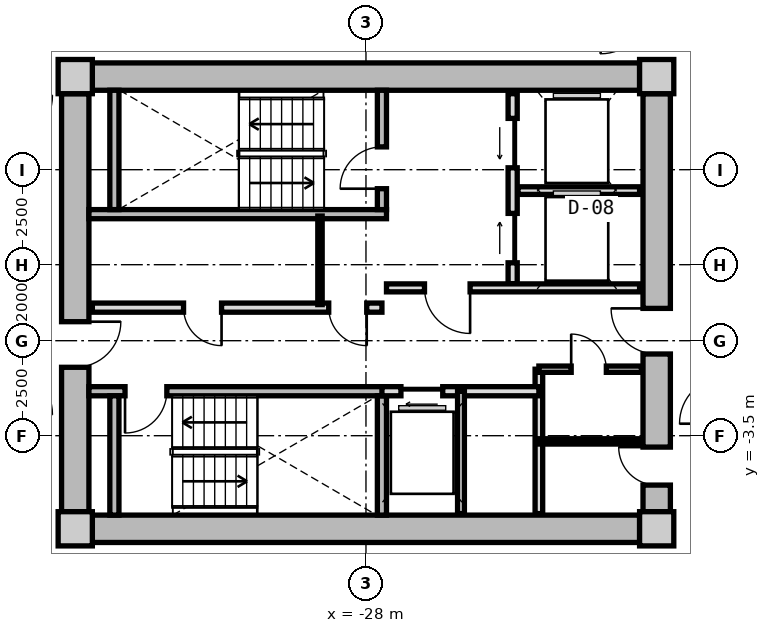
"""IFC4 building model, lengths in metres.
Left out: names, types, materials, properties, quantities, classifications, styles, units other than length and angle.
Written with IfcOpenShell. Run it as: python <this file> out.ifc"""

import sys

from ifc_helpers import new_model, si_unit, direction, frame, frame_2d, origin, origin_2d, place, context, subcontext, project, spatial, rectangle, extrude, source, transform, mapped, element, fill, save


model = new_model("IFC4")
c1 = context("Model", 3, precision=1e-05, world=origin(), true_north=direction((0.0, 1.0)))
c2 = subcontext(c1, "Body", "Model", "MODEL_VIEW")
j1 = project(units=[si_unit("LENGTHUNIT", "METRE"), si_unit("PLANEANGLEUNIT", "RADIAN")], contexts=[c1])
p1 = place(None, origin())
s1 = spatial("IfcSite", under=j1, at=p1, CompositionType="ELEMENT")
p2 = place(p1, origin())
s2 = spatial("IfcBuilding", under=s1, at=p2, CompositionType="ELEMENT")
p3 = place(p2, frame((0.0, 0.0, 93.2)))
s3 = spatial("IfcBuildingStorey", under=s2, at=p3, CompositionType="ELEMENT", Elevation=93.2)
m1 = source(origin(), c2, "Body", "SweptSolid", [
    extrude(rectangle(XDim=0.9, YDim=0.9, at=origin_2d()), origin(), (0.0, 0.0, 1.0), 3.05),
])
for number, where, z_axis, x_axis in (
    (1, (-35.65, -5.95, 0.0), (0.0, 0.0, 1.0), (1.0, 0.0, 0.0)),
    (2, (-20.35, -5.95, 0.0), (0.0, 0.0, 1.0), (1.0, 0.0, 0.0)),
    (3, (-20.35, 5.95, 0.0), (0.0, 0.0, 1.0), (1.0, 0.0, 0.0)),
    (4, (-35.65, 5.95, 0.0), (0.0, 0.0, 1.0), (1.0, 0.0, 0.0)),
):
    element("IfcColumn", number, at=place(p3, frame(where, z_axis=z_axis, x_axis=x_axis)), inside=s3, PredefinedType="COLUMN", context=c2, shape_type="MappedRepresentation", body=[
        mapped(m1, transform((0.0, 0.0, 0.0), x_axis=(1.0, 0.0, 0.0), y_axis=(0.0, 1.0, 0.0), z_axis=(0.0, 0.0, 1.0), scale=1.0)),
    ])
m2 = source(origin(), c2, "Body", "SweptSolid", [
    extrude(rectangle(XDim=14.4, YDim=0.72, at=frame_2d((7.2, 0.0))), origin(), (0.0, 0.0, 1.0), 2.79),
])
for number, where, z_axis, x_axis in (
    (5, (-35.2, 5.95, 0.0), (0.0, 0.0, 1.0), (1.0, 0.0, 0.0)),
    (6, (-20.8, -5.95, 0.0), (0.0, 0.0, 1.0), (-1.0, 0.0, 0.0)),
):
    element("IfcWall", number, at=place(p3, frame(where, z_axis=z_axis, x_axis=x_axis)), inside=s3, PredefinedType="SHEAR", context=c2, shape_type="MappedRepresentation", body=[
        mapped(m2, transform((0.0, 0.0, 0.0), x_axis=(1.0, 0.0, 0.0), y_axis=(0.0, 1.0, 0.0), z_axis=(0.0, 0.0, 1.0), scale=1.0)),
    ])
m3 = source(origin(), c2, "Body", "SweptSolid", [
    extrude(rectangle(XDim=11.0, YDim=0.72, at=frame_2d((5.5, 0.0))), origin(), (0.0, 0.0, 1.0), 2.79),
])
p4 = place(p3, frame((-35.65, -5.5, 0.0), z_axis=(0.0, 0.0, 1.0), x_axis=(0.0, 1.0, 0.0)))
e7 = element("IfcWall", 7, at=p4, inside=s3, PredefinedType="SHEAR", context=c2, shape_type="MappedRepresentation", body=[
    mapped(m3, transform((0.0, 0.0, 0.0), x_axis=(1.0, 0.0, 0.0), y_axis=(0.0, 1.0, 0.0), z_axis=(0.0, 0.0, 1.0), scale=1.0)),
])
p5 = place(p4, frame((3.8, 0.0, 0.0)))
e8 = element("IfcOpeningElement", 8, at=p5, cuts=e7, PredefinedType="OPENING", context=c2, shape_type="SweptSolid", body=[
    extrude(rectangle(XDim=1.2, YDim=2.15, at=frame_2d((0.6, 1.075))), frame((0.0, 0.37, 0.0), z_axis=(0.0, -1.0, 0.0), x_axis=(1.0, 0.0, 0.0)), (0.0, 0.0, 1.0), 0.74),
])
p6 = place(p3, frame((-20.35, 5.5, 0.0), z_axis=(0.0, 0.0, 1.0), x_axis=(0.0, -1.0, 0.0)))
e9 = element("IfcWall", 9, at=p6, inside=s3, PredefinedType="SHEAR", context=c2, shape_type="MappedRepresentation", body=[
    mapped(m3, transform((0.0, 0.0, 0.0), x_axis=(1.0, 0.0, 0.0), y_axis=(0.0, 1.0, 0.0), z_axis=(0.0, 0.0, 1.0), scale=1.0)),
])
p7 = place(p6, frame((5.65, 0.0, 0.0)))
e10 = element("IfcOpeningElement", 10, at=p7, cuts=e9, PredefinedType="OPENING", context=c2, shape_type="SweptSolid", body=[
    extrude(rectangle(XDim=1.2, YDim=2.15, at=frame_2d((0.6, 1.075))), frame((0.0, 0.37, 0.0), z_axis=(0.0, -1.0, 0.0), x_axis=(1.0, 0.0, 0.0)), (0.0, 0.0, 1.0), 0.74),
])
p8 = place(p6, frame((9.3, 0.0, 0.0)))
e11 = element("IfcOpeningElement", 11, at=p8, cuts=e9, PredefinedType="OPENING", context=c2, shape_type="SweptSolid", body=[
    extrude(rectangle(XDim=1.0, YDim=2.1, at=frame_2d((0.5, 1.05))), frame((0.0, 0.37, 0.0), z_axis=(0.0, -1.0, 0.0), x_axis=(1.0, 0.0, 0.0)), (0.0, 0.0, 1.0), 0.74),
])
m4 = source(origin(), c2, "Body", "SweptSolid", [
    extrude(rectangle(XDim=7.83, YDim=0.24, at=frame_2d((3.915, 0.0))), origin(), (0.0, 0.0, 1.0), 2.79),
])
p9 = place(p3, frame((-35.29, 2.33, 0.0), z_axis=(0.0, 0.0, 1.0), x_axis=(1.0, 0.0, 0.0)))
e12 = element("IfcWall", 12, at=p9, inside=s3, PredefinedType="PARTITIONING", context=c2, shape_type="MappedRepresentation", body=[
    mapped(m4, transform((0.0, 0.0, 0.0), x_axis=(1.0, 0.0, 0.0), y_axis=(0.0, 1.0, 0.0), z_axis=(0.0, 0.0, 1.0), scale=1.0)),
])
m5 = source(origin(), c2, "Body", "SweptSolid", [
    extrude(rectangle(XDim=3.14, YDim=0.24, at=frame_2d((1.57, 0.0))), origin(), (0.0, 0.0, 1.0), 2.79),
])
p10 = place(p3, frame((-34.62, 2.45, 0.0), z_axis=(0.0, 0.0, 1.0), x_axis=(0.0, 1.0, 0.0)))
e13 = element("IfcWall", 13, at=p10, inside=s3, PredefinedType="PARTITIONING", context=c2, shape_type="MappedRepresentation", body=[
    mapped(m5, transform((0.0, 0.0, 0.0), x_axis=(1.0, 0.0, 0.0), y_axis=(0.0, 1.0, 0.0), z_axis=(0.0, 0.0, 1.0), scale=1.0)),
])
p11 = place(p3, frame((-27.58, 2.45, 0.0), z_axis=(0.0, 0.0, 1.0), x_axis=(0.0, 1.0, 0.0)))
e14 = element("IfcWall", 14, at=p11, inside=s3, PredefinedType="PARTITIONING", context=c2, shape_type="MappedRepresentation", body=[
    mapped(m5, transform((0.0, 0.0, 0.0), x_axis=(1.0, 0.0, 0.0), y_axis=(0.0, 1.0, 0.0), z_axis=(0.0, 0.0, 1.0), scale=1.0)),
])
p12 = place(p11, frame((0.55, 0.0, 0.0)))
e15 = element("IfcOpeningElement", 15, at=p12, cuts=e14, PredefinedType="OPENING", context=c2, shape_type="SweptSolid", body=[
    extrude(rectangle(XDim=1.1, YDim=2.15, at=frame_2d((0.55, 1.075))), frame((0.0, 0.13, 0.0), z_axis=(0.0, -1.0, 0.0), x_axis=(1.0, 0.0, 0.0)), (0.0, 0.0, 1.0), 0.26),
])
p13 = place(p3, frame((-35.29, -2.33, 0.0), z_axis=(0.0, 0.0, 1.0), x_axis=(1.0, 0.0, 0.0)))
e16 = element("IfcWall", 16, at=p13, inside=s3, PredefinedType="PARTITIONING", context=c2, shape_type="MappedRepresentation", body=[
    mapped(m4, transform((0.0, 0.0, 0.0), x_axis=(1.0, 0.0, 0.0), y_axis=(0.0, 1.0, 0.0), z_axis=(0.0, 0.0, 1.0), scale=1.0)),
])
p14 = place(p13, frame((0.95, 0.0, 0.0)))
e17 = element("IfcOpeningElement", 17, at=p14, cuts=e16, PredefinedType="OPENING", context=c2, shape_type="SweptSolid", body=[
    extrude(rectangle(XDim=1.1, YDim=2.15, at=frame_2d((0.55, 1.075))), frame((0.0, 0.13, 0.0), z_axis=(0.0, -1.0, 0.0), x_axis=(1.0, 0.0, 0.0)), (0.0, 0.0, 1.0), 0.26),
])
for number, where, z_axis, x_axis in (
    (18, (-34.62, -5.59, 0.0), (0.0, 0.0, 1.0), (0.0, 1.0, 0.0)),
    (19, (-27.58, -5.59, 0.0), (0.0, 0.0, 1.0), (0.0, 1.0, 0.0)),
):
    element("IfcWall", number, at=place(p3, frame(where, z_axis=z_axis, x_axis=x_axis)), inside=s3, PredefinedType="PARTITIONING", context=c2, shape_type="MappedRepresentation", body=[
        mapped(m5, transform((0.0, 0.0, 0.0), x_axis=(1.0, 0.0, 0.0), y_axis=(0.0, 1.0, 0.0), z_axis=(0.0, 0.0, 1.0), scale=1.0)),
    ])
m6 = source(origin(), c2, "Body", "SweptSolid", [
    extrude(rectangle(XDim=5.0, YDim=0.24, at=frame_2d((2.5, 0.0))), origin(), (0.0, 0.0, 1.0), 2.775),
])
p15 = place(p3, frame((-24.14, 0.5, 0.0), z_axis=(0.0, 0.0, 1.0), x_axis=(0.0, 1.0, 0.0)))
e20 = element("IfcWall", 20, at=p15, inside=s3, PredefinedType="PARTITIONING", context=c2, shape_type="MappedRepresentation", body=[
    mapped(m6, transform((0.0, 0.0, 0.0), x_axis=(1.0, 0.0, 0.0), y_axis=(0.0, 1.0, 0.0), z_axis=(0.0, 0.0, 1.0), scale=1.0)),
])
p16 = place(p15, frame((3.05, 0.0, 0.0)))
e21 = element("IfcOpeningElement", 21, at=p16, cuts=e20, PredefinedType="OPENING", context=c2, shape_type="SweptSolid", body=[
    extrude(rectangle(XDim=1.3, YDim=2.2, at=frame_2d((0.65, 1.1))), frame((0.0, 0.13, 0.0), z_axis=(0.0, -1.0, 0.0), x_axis=(1.0, 0.0, 0.0)), (0.0, 0.0, 1.0), 0.26),
])
p17 = place(p15, frame((0.55, 0.0, 0.0)))
e22 = element("IfcOpeningElement", 22, at=p17, cuts=e20, PredefinedType="OPENING", context=c2, shape_type="SweptSolid", body=[
    extrude(rectangle(XDim=1.3, YDim=2.2, at=frame_2d((0.65, 1.1))), frame((0.0, 0.13, 0.0), z_axis=(0.0, -1.0, 0.0), x_axis=(1.0, 0.0, 0.0)), (0.0, 0.0, 1.0), 0.26),
])
m7 = source(origin(), c2, "Body", "SweptSolid", [
    extrude(rectangle(XDim=3.2, YDim=0.2, at=frame_2d((1.6, 0.0))), origin(), (0.0, 0.0, 1.0), 2.775),
])
p18 = place(p3, frame((-24.0, 2.95, 0.0), z_axis=(0.0, 0.0, 1.0), x_axis=(1.0, 0.0, 0.0)))
e23 = element("IfcWall", 23, at=p18, inside=s3, PredefinedType="PARTITIONING", context=c2, shape_type="MappedRepresentation", body=[
    mapped(m7, transform((0.0, 0.0, 0.0), x_axis=(1.0, 0.0, 0.0), y_axis=(0.0, 1.0, 0.0), z_axis=(0.0, 0.0, 1.0), scale=1.0)),
])
m8 = source(origin(), c2, "Body", "SweptSolid", [
    extrude(rectangle(XDim=6.66, YDim=0.21, at=frame_2d((3.33, 0.0))), origin(), (0.0, 0.0, 1.0), 2.775),
])
p19 = place(p3, frame((-27.46, 0.39, 0.0), z_axis=(0.0, 0.0, 1.0), x_axis=(1.0, 0.0, 0.0)))
e24 = element("IfcWall", 24, at=p19, inside=s3, PredefinedType="PARTITIONING", context=c2, shape_type="MappedRepresentation", body=[
    mapped(m8, transform((0.0, 0.0, 0.0), x_axis=(1.0, 0.0, 0.0), y_axis=(0.0, 1.0, 0.0), z_axis=(0.0, 0.0, 1.0), scale=1.0)),
])
p20 = place(p19, frame((1.0, 0.0, 0.0)))
e25 = element("IfcOpeningElement", 25, at=p20, cuts=e24, PredefinedType="OPENING", context=c2, shape_type="SweptSolid", body=[
    extrude(rectangle(XDim=1.2, YDim=2.15, at=frame_2d((0.6, 1.075))), frame((0.0, 0.115, 0.0), z_axis=(0.0, -1.0, 0.0), x_axis=(1.0, 0.0, 0.0)), (0.0, 0.0, 1.0), 0.23),
])
m9 = source(origin(), c2, "Body", "SweptSolid", [
    extrude(rectangle(XDim=7.62, YDim=0.24, at=frame_2d((3.81, 0.0))), origin(), (0.0, 0.0, 1.0), 2.775),
])
p21 = place(p3, frame((-35.2, -0.13, 0.0), z_axis=(0.0, 0.0, 1.0), x_axis=(1.0, 0.0, 0.0)))
e26 = element("IfcWall", 26, at=p21, inside=s3, PredefinedType="PARTITIONING", context=c2, shape_type="MappedRepresentation", body=[
    mapped(m9, transform((0.0, 0.0, 0.0), x_axis=(1.0, 0.0, 0.0), y_axis=(0.0, 1.0, 0.0), z_axis=(0.0, 0.0, 1.0), scale=1.0)),
])
p22 = place(p21, frame((6.22, 0.0, 0.0)))
e27 = element("IfcOpeningElement", 27, at=p22, cuts=e26, PredefinedType="OPENING", context=c2, shape_type="SweptSolid", body=[
    extrude(rectangle(XDim=1.0, YDim=2.1, at=frame_2d((0.5, 1.05))), frame((0.0, 0.13, 0.0), z_axis=(0.0, -1.0, 0.0), x_axis=(1.0, 0.0, 0.0)), (0.0, 0.0, 1.0), 0.26),
])
p23 = place(p21, frame((2.4, 0.0, 0.0)))
e28 = element("IfcOpeningElement", 28, at=p23, cuts=e26, PredefinedType="OPENING", context=c2, shape_type="SweptSolid", body=[
    extrude(rectangle(XDim=1.0, YDim=2.1, at=frame_2d((0.5, 1.05))), frame((0.0, 0.13, 0.0), z_axis=(0.0, -1.0, 0.0), x_axis=(1.0, 0.0, 0.0)), (0.0, 0.0, 1.0), 0.26),
])
m10 = source(origin(), c2, "Body", "SweptSolid", [
    extrude(rectangle(XDim=2.33, YDim=0.115, at=frame_2d((1.165, 0.0))), origin(), (0.0, 0.0, 1.0), 2.775),
])
p24 = place(p3, frame((-29.21, -0.05, 0.0), z_axis=(0.0, 0.0, 1.0), x_axis=(0.0, 1.0, 0.0)))
e29 = element("IfcWall", 29, at=p24, inside=s3, PredefinedType="PARTITIONING", context=c2, shape_type="MappedRepresentation", body=[
    mapped(m10, transform((0.0, 0.0, 0.0), x_axis=(1.0, 0.0, 0.0), y_axis=(0.0, 1.0, 0.0), z_axis=(0.0, 0.0, 1.0), scale=1.0)),
])
m11 = source(origin(), c2, "Body", "SweptSolid", [
    extrude(rectangle(XDim=3.8, YDim=0.2, at=frame_2d((1.9, 0.0))), origin(), (0.0, 0.0, 1.0), 2.775),
])
p25 = place(p3, frame((-23.45, -5.55, 0.0), z_axis=(0.0, 0.0, 1.0), x_axis=(0.0, 1.0, 0.0)))
e30 = element("IfcWall", 30, at=p25, inside=s3, PredefinedType="PARTITIONING", context=c2, shape_type="MappedRepresentation", body=[
    mapped(m11, transform((0.0, 0.0, 0.0), x_axis=(1.0, 0.0, 0.0), y_axis=(0.0, 1.0, 0.0), z_axis=(0.0, 0.0, 1.0), scale=1.0)),
])
m12 = source(origin(), c2, "Body", "SweptSolid", [
    extrude(rectangle(XDim=4.13, YDim=0.24, at=frame_2d((2.065, 0.0))), origin(), (0.0, 0.0, 1.0), 2.775),
])
p26 = place(p3, frame((-27.58, -2.33, 0.0), z_axis=(0.0, 0.0, 1.0), x_axis=(1.0, 0.0, 0.0)))
e31 = element("IfcWall", 31, at=p26, inside=s3, PredefinedType="PARTITIONING", context=c2, shape_type="MappedRepresentation", body=[
    mapped(m12, transform((0.0, 0.0, 0.0), x_axis=(1.0, 0.0, 0.0), y_axis=(0.0, 1.0, 0.0), z_axis=(0.0, 0.0, 1.0), scale=1.0)),
])
p27 = place(p26, frame((0.5, 0.0, 0.0)))
e32 = element("IfcOpeningElement", 32, at=p27, cuts=e31, PredefinedType="OPENING", context=c2, shape_type="SweptSolid", body=[
    extrude(rectangle(XDim=1.1, YDim=2.2, at=frame_2d((0.55, 1.1))), frame((0.0, 0.13, 0.0), z_axis=(0.0, -1.0, 0.0), x_axis=(1.0, 0.0, 0.0)), (0.0, 0.0, 1.0), 0.26),
])
m13 = source(origin(), c2, "Body", "SweptSolid", [
    extrude(rectangle(XDim=3.22, YDim=0.18, at=frame_2d((1.61, 0.0))), origin(), (0.0, 0.0, 1.0), 2.775),
])
p28 = place(p3, frame((-25.5, -5.55, 0.0), z_axis=(0.0, 0.0, 1.0), x_axis=(0.0, 1.0, 0.0)))
e33 = element("IfcWall", 33, at=p28, inside=s3, PredefinedType="PARTITIONING", context=c2, shape_type="MappedRepresentation", body=[
    mapped(m13, transform((0.0, 0.0, 0.0), x_axis=(1.0, 0.0, 0.0), y_axis=(0.0, 1.0, 0.0), z_axis=(0.0, 0.0, 1.0), scale=1.0)),
])
m14 = source(origin(), c2, "Body", "SweptSolid", [
    extrude(rectangle(XDim=2.7, YDim=0.165, at=frame_2d((1.35, 0.0))), origin(), (0.0, 0.0, 1.0), 2.775),
])
p29 = place(p3, frame((-23.45, -1.75, 0.0), z_axis=(0.0, 0.0, 1.0), x_axis=(1.0, 0.0, 0.0)))
e34 = element("IfcWall", 34, at=p29, inside=s3, PredefinedType="PARTITIONING", context=c2, shape_type="MappedRepresentation", body=[
    mapped(m14, transform((0.0, 0.0, 0.0), x_axis=(1.0, 0.0, 0.0), y_axis=(0.0, 1.0, 0.0), z_axis=(0.0, 0.0, 1.0), scale=1.0)),
])
p30 = place(p29, frame((0.85, 0.0, 0.0)))
e35 = element("IfcOpeningElement", 35, at=p30, cuts=e34, PredefinedType="OPENING", context=c2, shape_type="SweptSolid", body=[
    extrude(rectangle(XDim=0.925, YDim=2.1, at=frame_2d((0.462, 1.05))), frame((0.0, 0.093, 0.0), z_axis=(0.0, -1.0, 0.0), x_axis=(1.0, 0.0, 0.0)), (0.0, 0.0, 1.0), 0.185),
])
m15 = source(origin(), c2, "Body", "SweptSolid", [
    extrude(rectangle(XDim=2.7, YDim=0.14, at=frame_2d((1.35, 0.0))), origin(), (0.0, 0.0, 1.0), 2.775),
])
p31 = place(p3, frame((-23.45, -3.65, 0.0), z_axis=(0.0, 0.0, 1.0), x_axis=(1.0, 0.0, 0.0)))
e36 = element("IfcWall", 36, at=p31, inside=s3, PredefinedType="PARTITIONING", context=c2, shape_type="MappedRepresentation", body=[
    mapped(m15, transform((0.0, 0.0, 0.0), x_axis=(1.0, 0.0, 0.0), y_axis=(0.0, 1.0, 0.0), z_axis=(0.0, 0.0, 1.0), scale=1.0)),
])
m16 = source(origin(), c2, "Body", "SweptSolid", [
    extrude(rectangle(XDim=1.1, YDim=2.15, at=frame_2d((0.55, 1.075))), frame((0.0, 0.025, 0.0), z_axis=(0.0, -1.0, 0.0), x_axis=(1.0, 0.0, 0.0)), (0.0, 0.0, 1.0), 0.05),
])
p32 = place(p12, origin())
e37 = element("IfcDoor", 37, at=p32, inside=s3, OperationType="SINGLE_SWING_LEFT", PredefinedType="DOOR", context=c2, shape_type="MappedRepresentation", body=[
    mapped(m16, transform((0.0, 0.0, 0.0), x_axis=(1.0, 0.0, 0.0), y_axis=(0.0, 1.0, 0.0), z_axis=(0.0, 0.0, 1.0), scale=1.0)),
])
fill(e15, e37)
p33 = place(p14, frame((1.1, 0.0, 0.0), z_axis=(0.0, 0.0, 1.0), x_axis=(-1.0, 0.0, 0.0)))
e38 = element("IfcDoor", 38, at=p33, inside=s3, OperationType="SINGLE_SWING_RIGHT", PredefinedType="DOOR", context=c2, shape_type="MappedRepresentation", body=[
    mapped(m16, transform((0.0, 0.0, 0.0), x_axis=(1.0, 0.0, 0.0), y_axis=(0.0, 1.0, 0.0), z_axis=(0.0, 0.0, 1.0), scale=1.0)),
])
fill(e17, e38)
m17 = source(origin(), c2, "Body", "SweptSolid", [
    extrude(rectangle(XDim=1.3, YDim=2.2, at=frame_2d((0.65, 1.1))), frame((0.0, 0.025, 0.0), z_axis=(0.0, -1.0, 0.0), x_axis=(1.0, 0.0, 0.0)), (0.0, 0.0, 1.0), 0.05),
])
p34 = place(p16, origin())
e39 = element("IfcDoor", 39, at=p34, inside=s3, OperationType="SLIDING_TO_LEFT", PredefinedType="DOOR", context=c2, shape_type="MappedRepresentation", body=[
    mapped(m17, transform((0.0, 0.0, 0.0), x_axis=(1.0, 0.0, 0.0), y_axis=(0.0, 1.0, 0.0), z_axis=(0.0, 0.0, 1.0), scale=1.0)),
])
fill(e21, e39)
p35 = place(p17, origin())
e40 = element("IfcDoor", 40, at=p35, inside=s3, OperationType="SLIDING_TO_RIGHT", PredefinedType="DOOR", context=c2, shape_type="MappedRepresentation", body=[
    mapped(m17, transform((0.0, 0.0, 0.0), x_axis=(1.0, 0.0, 0.0), y_axis=(0.0, 1.0, 0.0), z_axis=(0.0, 0.0, 1.0), scale=1.0)),
])
fill(e22, e40)
m18 = source(origin(), c2, "Body", "SweptSolid", [
    extrude(rectangle(XDim=1.2, YDim=2.15, at=frame_2d((0.6, 1.075))), frame((0.0, 0.025, 0.0), z_axis=(0.0, -1.0, 0.0), x_axis=(1.0, 0.0, 0.0)), (0.0, 0.0, 1.0), 0.05),
])
p36 = place(p20, frame((1.2, 0.0, 0.0), z_axis=(0.0, 0.0, 1.0), x_axis=(-1.0, 0.0, 0.0)))
e41 = element("IfcDoor", 41, at=p36, inside=s3, OperationType="SINGLE_SWING_LEFT", PredefinedType="DOOR", context=c2, shape_type="MappedRepresentation", body=[
    mapped(m18, transform((0.0, 0.0, 0.0), x_axis=(1.0, 0.0, 0.0), y_axis=(0.0, 1.0, 0.0), z_axis=(0.0, 0.0, 1.0), scale=1.0)),
])
fill(e25, e41)
p37 = place(p5, frame((1.2, 0.0, 0.0), z_axis=(0.0, 0.0, 1.0), x_axis=(-1.0, 0.0, 0.0)))
e42 = element("IfcDoor", 42, at=p37, inside=s3, OperationType="SINGLE_SWING_LEFT", PredefinedType="DOOR", context=c2, shape_type="MappedRepresentation", body=[
    mapped(m18, transform((0.0, 0.0, 0.0), x_axis=(1.0, 0.0, 0.0), y_axis=(0.0, 1.0, 0.0), z_axis=(0.0, 0.0, 1.0), scale=1.0)),
])
fill(e8, e42)
p38 = place(p7, frame((1.2, 0.0, 0.0), z_axis=(0.0, 0.0, 1.0), x_axis=(-1.0, 0.0, 0.0)))
e43 = element("IfcDoor", 43, at=p38, inside=s3, OperationType="SINGLE_SWING_RIGHT", PredefinedType="DOOR", context=c2, shape_type="MappedRepresentation", body=[
    mapped(m18, transform((0.0, 0.0, 0.0), x_axis=(1.0, 0.0, 0.0), y_axis=(0.0, 1.0, 0.0), z_axis=(0.0, 0.0, 1.0), scale=1.0)),
])
fill(e10, e43)
m19 = source(origin(), c2, "Body", "SweptSolid", [
    extrude(rectangle(XDim=1.0, YDim=2.1, at=frame_2d((0.5, 1.05))), frame((0.0, 0.025, 0.0), z_axis=(0.0, -1.0, 0.0), x_axis=(1.0, 0.0, 0.0)), (0.0, 0.0, 1.0), 0.05),
])
p39 = place(p22, frame((1.0, 0.0, 0.0), z_axis=(0.0, 0.0, 1.0), x_axis=(-1.0, 0.0, 0.0)))
e44 = element("IfcDoor", 44, at=p39, inside=s3, OperationType="SINGLE_SWING_LEFT", PredefinedType="DOOR", context=c2, shape_type="MappedRepresentation", body=[
    mapped(m19, transform((0.0, 0.0, 0.0), x_axis=(1.0, 0.0, 0.0), y_axis=(0.0, 1.0, 0.0), z_axis=(0.0, 0.0, 1.0), scale=1.0)),
])
fill(e27, e44)
p40 = place(p23, frame((1.0, 0.0, 0.0), z_axis=(0.0, 0.0, 1.0), x_axis=(-1.0, 0.0, 0.0)))
e45 = element("IfcDoor", 45, at=p40, inside=s3, OperationType="SINGLE_SWING_LEFT", PredefinedType="DOOR", context=c2, shape_type="MappedRepresentation", body=[
    mapped(m19, transform((0.0, 0.0, 0.0), x_axis=(1.0, 0.0, 0.0), y_axis=(0.0, 1.0, 0.0), z_axis=(0.0, 0.0, 1.0), scale=1.0)),
])
fill(e28, e45)
m20 = source(origin(), c2, "Body", "SweptSolid", [
    extrude(rectangle(XDim=1.1, YDim=2.2, at=frame_2d((0.55, 1.1))), frame((0.0, 0.025, 0.0), z_axis=(0.0, -1.0, 0.0), x_axis=(1.0, 0.0, 0.0)), (0.0, 0.0, 1.0), 0.05),
])
p41 = place(p27, frame((1.1, 0.0, 0.0), z_axis=(0.0, 0.0, 1.0), x_axis=(-1.0, 0.0, 0.0)))
e46 = element("IfcDoor", 46, at=p41, inside=s3, OperationType="SLIDING_TO_LEFT", PredefinedType="DOOR", context=c2, shape_type="MappedRepresentation", body=[
    mapped(m20, transform((0.0, 0.0, 0.0), x_axis=(1.0, 0.0, 0.0), y_axis=(0.0, 1.0, 0.0), z_axis=(0.0, 0.0, 1.0), scale=1.0)),
])
fill(e32, e46)
m21 = source(origin(), c2, "Body", "SweptSolid", [
    extrude(rectangle(XDim=0.925, YDim=2.1, at=frame_2d((0.462, 1.05))), frame((0.0, 0.025, 0.0), z_axis=(0.0, -1.0, 0.0), x_axis=(1.0, 0.0, 0.0)), (0.0, 0.0, 1.0), 0.05),
])
p42 = place(p30, origin())
e47 = element("IfcDoor", 47, at=p42, inside=s3, OperationType="SINGLE_SWING_LEFT", PredefinedType="DOOR", context=c2, shape_type="MappedRepresentation", body=[
    mapped(m21, transform((0.0, 0.0, 0.0), x_axis=(1.0, 0.0, 0.0), y_axis=(0.0, 1.0, 0.0), z_axis=(0.0, 0.0, 1.0), scale=1.0)),
])
fill(e35, e47)
p43 = place(p8, frame((1.0, 0.0, 0.0), z_axis=(0.0, 0.0, 1.0), x_axis=(-1.0, 0.0, 0.0)))
e48 = element("IfcDoor", 48, at=p43, inside=s3, OperationType="SINGLE_SWING_RIGHT", PredefinedType="DOOR", context=c2, shape_type="MappedRepresentation", body=[
    mapped(m19, transform((0.0, 0.0, 0.0), x_axis=(1.0, 0.0, 0.0), y_axis=(0.0, 1.0, 0.0), z_axis=(0.0, 0.0, 1.0), scale=1.0)),
])
fill(e11, e48)
save(model, sys.argv[1])
